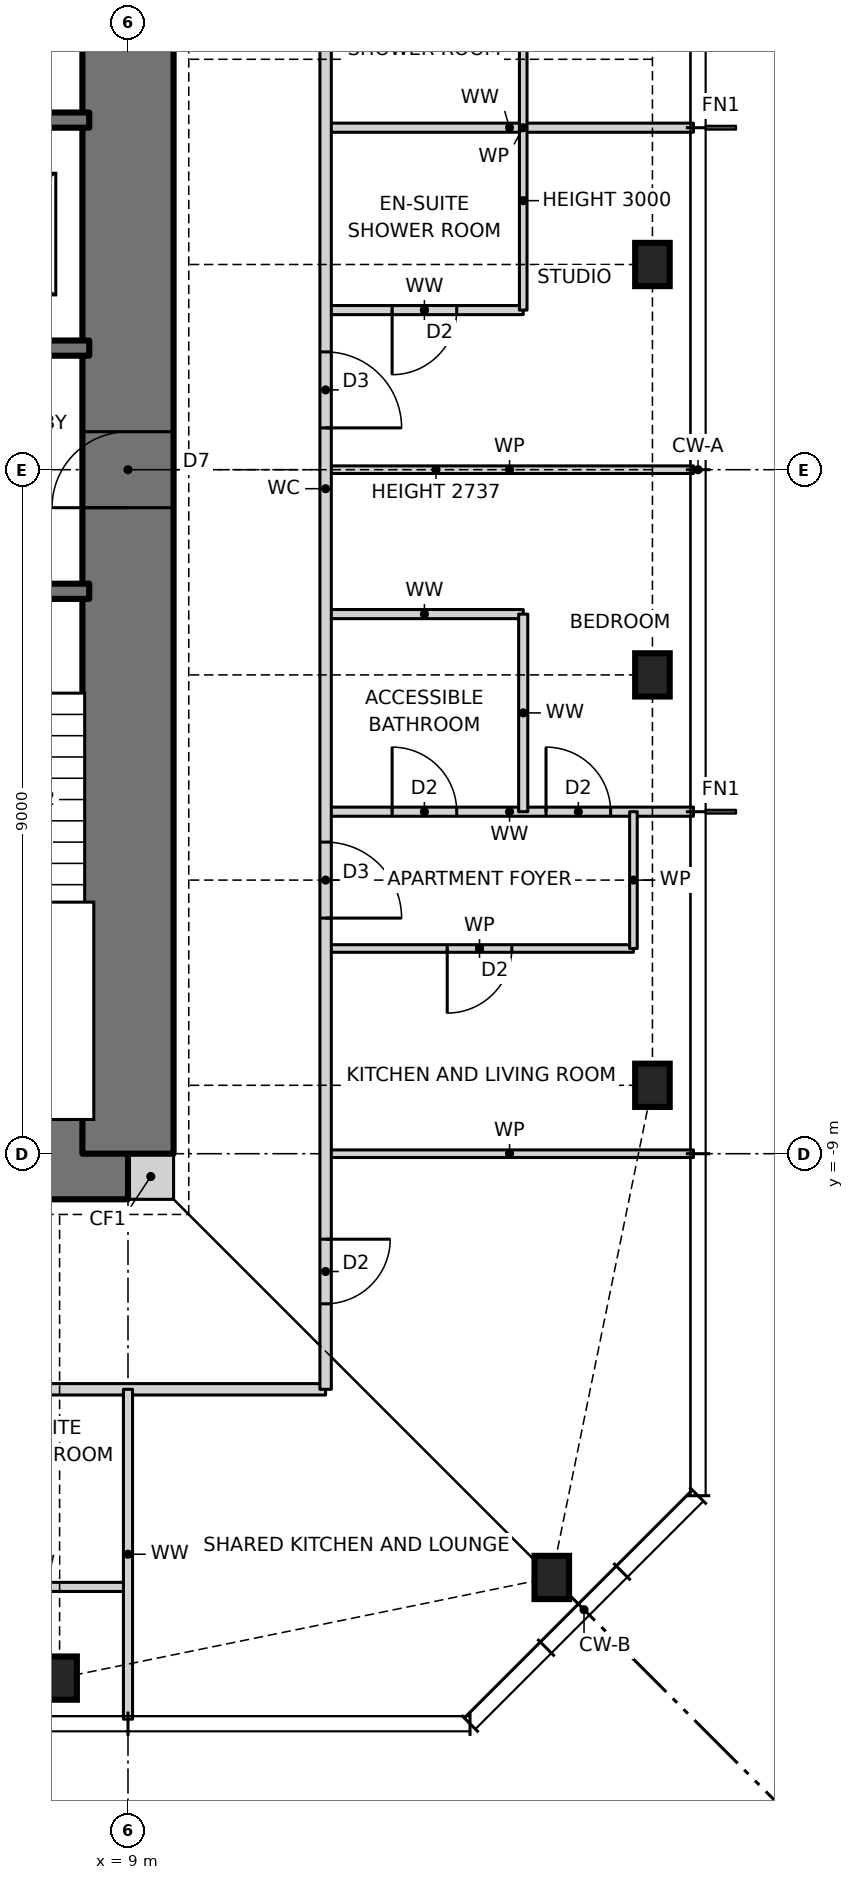
"""IFC4 building model, lengths in metres.
Left out: names, types, materials, properties, quantities, classifications, styles, units other than length and angle.
Written with IfcOpenShell. Run it as: python <this file> out.ifc"""

import sys

from ifc_helpers import new_model, si_unit, direction, frame, frame_2d, origin, origin_2d, place, context, subcontext, project, spatial, rectangle, i_section, extrude, element, fill, save


model = new_model("IFC4")
c1 = context("Model", 3, precision=1e-05, world=origin(), true_north=direction((0.0, 1.0)))
c2 = subcontext(c1, "Body", "Model", "MODEL_VIEW")
j1 = project(units=[si_unit("LENGTHUNIT", "METRE"), si_unit("PLANEANGLEUNIT", "RADIAN")], contexts=[c1])
p1 = place(None, origin())
s1 = spatial("IfcSite", under=j1, at=p1, CompositionType="ELEMENT")
p2 = place(p1, origin())
s2 = spatial("IfcBuilding", under=s1, at=p2, CompositionType="ELEMENT")
p3 = place(p2, frame((0.0, 0.0, 260.5)))
s3 = spatial("IfcBuildingStorey", under=s2, at=p3, CompositionType="ELEMENT", Elevation=260.5)
for number, where, z_axis, x_axis in (
    (1, (8.1, -15.9, 0.0), (0.0, 0.0, 1.0), (1.0, 0.0, 0.0)),
    (2, (14.576, -14.576, 0.0), (0.0, 0.0, 1.0), (1.0, 0.0, 0.0)),
    (3, (15.9, -8.1, 0.0), (0.0, 0.0, 1.0), (1.0, 0.0, 0.0)),
    (4, (15.9, -2.7, 0.0), (0.0, 0.0, 1.0), (1.0, 0.0, 0.0)),
    (5, (15.9, 2.7, 0.0), (0.0, 0.0, 1.0), (1.0, 0.0, 0.0)),
):
    element("IfcColumn", number, at=place(p3, frame(where, z_axis=z_axis, x_axis=x_axis)), inside=s3, PredefinedType="COLUMN", context=c2, shape_type="SweptSolid", body=[
        extrude(i_section(OverallWidth=0.455, OverallDepth=0.569, WebThickness=0.078, FlangeThickness=0.125, at=origin_2d()), origin(), (0.0, 0.0, 1.0), 3.5),
    ])
p4 = place(p3, frame((9.0, -9.3, 0.0), z_axis=(0.0, 0.0, 1.0), x_axis=(1.0, 0.0, 0.0)))
e6 = element("IfcWall", 6, at=p4, inside=s3, PredefinedType="SOLIDWALL", context=c2, shape_type="SweptSolid", body=[
    extrude(rectangle(XDim=0.6, YDim=0.6, at=frame_2d((0.3, 0.0))), origin(), (0.0, 0.0, 1.0), 3.5),
])
p5 = place(p3, frame((-9.0, -9.0, 0.0), z_axis=(0.0, 0.0, 1.0), x_axis=(1.0, 0.0, 0.0)))
e7 = element("IfcWall", 7, at=p5, inside=s3, PredefinedType="SHEAR", context=c2, shape_type="SweptSolid", body=[
    extrude(rectangle(XDim=18.0, YDim=1.2, at=frame_2d((9.0, 0.0))), origin(), (0.0, 0.0, 1.0), 3.5),
])
p6 = place(p5, frame((3.775, 0.0, 0.0)))
e8 = element("IfcOpeningElement", 8, at=p6, cuts=e7, PredefinedType="OPENING", context=c2, shape_type="SweptSolid", body=[
    extrude(rectangle(XDim=0.9, YDim=2.1, at=frame_2d((0.45, 1.05))), frame((0.0, 0.61, 0.0), z_axis=(0.0, -1.0, 0.0), x_axis=(1.0, 0.0, 0.0)), (0.0, 0.0, 1.0), 1.22),
])
p7 = place(p5, frame((10.625, 0.0, 0.0)))
e9 = element("IfcOpeningElement", 9, at=p7, cuts=e7, PredefinedType="OPENING", context=c2, shape_type="SweptSolid", body=[
    extrude(rectangle(XDim=0.9, YDim=2.1, at=frame_2d((0.45, 1.05))), frame((0.0, 0.61, 0.0), z_axis=(0.0, -1.0, 0.0), x_axis=(1.0, 0.0, 0.0)), (0.0, 0.0, 1.0), 1.22),
])
p8 = place(p3, frame((9.0, -9.0, 0.0), z_axis=(0.0, 0.0, 1.0), x_axis=(0.0, 1.0, 0.0)))
e10 = element("IfcWall", 10, at=p8, inside=s3, PredefinedType="SHEAR", context=c2, shape_type="SweptSolid", body=[
    extrude(rectangle(XDim=18.0, YDim=1.2, at=frame_2d((9.0, 0.0))), origin(), (0.0, 0.0, 1.0), 3.5),
])
p9 = place(p8, frame((8.5, 0.0, 0.0)))
e11 = element("IfcOpeningElement", 11, at=p9, cuts=e10, PredefinedType="OPENING", context=c2, shape_type="SweptSolid", body=[
    extrude(rectangle(XDim=1.0, YDim=2.1, at=frame_2d((0.5, 1.05))), frame((0.0, 0.61, 0.0), z_axis=(0.0, -1.0, 0.0), x_axis=(1.0, 0.0, 0.0)), (0.0, 0.0, 1.0), 1.22),
])
p10 = place(p3, frame((6.6, -14.7, 0.0), z_axis=(0.0, 0.0, 1.0), x_axis=(1.0, 0.0, 0.0)))
e12 = element("IfcWall", 12, at=p10, inside=s3, PredefinedType="PARTITIONING", context=c2, shape_type="SweptSolid", body=[
    extrude(rectangle(XDim=2.4, YDim=0.12, at=frame_2d((1.2, 0.0))), origin(), (0.0, 0.0, 1.0), 3.27),
])
p11 = place(p3, frame((-11.6, -12.1, 0.0), z_axis=(0.0, 0.0, 1.0), x_axis=(1.0, 0.0, 0.0)))
e13 = element("IfcWall", 13, at=p11, inside=s3, PredefinedType="PARTITIONING", context=c2, shape_type="SweptSolid", body=[
    extrude(rectangle(XDim=23.2, YDim=0.15, at=frame_2d((11.6, 0.0))), origin(), (0.0, 0.0, 1.0), 3.27),
])
p12 = place(p11, frame((6.2, 0.0, 0.0)))
e14 = element("IfcOpeningElement", 14, at=p12, cuts=e13, PredefinedType="OPENING", context=c2, shape_type="SweptSolid", body=[
    extrude(rectangle(XDim=1.8, YDim=2.1, at=frame_2d((0.9, 1.05))), frame((0.0, 0.085, 0.0), z_axis=(0.0, -1.0, 0.0), x_axis=(1.0, 0.0, 0.0)), (0.0, 0.0, 1.0), 0.17),
])
p13 = place(p11, frame((13.35, 0.0, 0.0)))
e15 = element("IfcOpeningElement", 15, at=p13, cuts=e13, PredefinedType="OPENING", context=c2, shape_type="SweptSolid", body=[
    extrude(rectangle(XDim=1.0, YDim=2.1, at=frame_2d((0.5, 1.05))), frame((0.0, 0.085, 0.0), z_axis=(0.0, -1.0, 0.0), x_axis=(1.0, 0.0, 0.0)), (0.0, 0.0, 1.0), 0.17),
])
p14 = place(p3, frame((11.6, -9.0, 0.0), z_axis=(0.0, 0.0, 1.0), x_axis=(1.0, 0.0, 0.0)))
e16 = element("IfcWall", 16, at=p14, inside=s3, PredefinedType="PARTITIONING", context=c2, shape_type="SweptSolid", body=[
    extrude(rectangle(XDim=4.84, YDim=0.1, at=frame_2d((2.42, 0.0))), origin(), (0.0, 0.0, 1.0), 3.27),
])
p15 = place(p3, frame((11.6, -6.3, 0.0), z_axis=(0.0, 0.0, 1.0), x_axis=(1.0, 0.0, 0.0)))
e17 = element("IfcWall", 17, at=p15, inside=s3, PredefinedType="PARTITIONING", context=c2, shape_type="SweptSolid", body=[
    extrude(rectangle(XDim=4.05, YDim=0.1, at=frame_2d((2.025, 0.0))), origin(), (0.0, 0.0, 1.0), 3.27),
])
p16 = place(p15, frame((1.6, 0.0, 0.0)))
e18 = element("IfcOpeningElement", 18, at=p16, cuts=e17, PredefinedType="OPENING", context=c2, shape_type="SweptSolid", body=[
    extrude(rectangle(XDim=0.85, YDim=2.1, at=frame_2d((0.425, 1.05))), frame((0.0, 0.06, 0.0), z_axis=(0.0, -1.0, 0.0), x_axis=(1.0, 0.0, 0.0)), (0.0, 0.0, 1.0), 0.12),
])
p17 = place(p3, frame((11.6, -4.5, 0.0), z_axis=(0.0, 0.0, 1.0), x_axis=(1.0, 0.0, 0.0)))
e19 = element("IfcWall", 19, at=p17, inside=s3, PredefinedType="PARTITIONING", context=c2, shape_type="SweptSolid", body=[
    extrude(rectangle(XDim=4.84, YDim=0.12, at=frame_2d((2.42, 0.0))), origin(), (0.0, 0.0, 1.0), 3.27),
])
p18 = place(p17, frame((2.9, 0.0, 0.0)))
e20 = element("IfcOpeningElement", 20, at=p18, cuts=e19, PredefinedType="OPENING", context=c2, shape_type="SweptSolid", body=[
    extrude(rectangle(XDim=0.85, YDim=2.1, at=frame_2d((0.425, 1.05))), frame((0.0, 0.07, 0.0), z_axis=(0.0, -1.0, 0.0), x_axis=(1.0, 0.0, 0.0)), (0.0, 0.0, 1.0), 0.14),
])
p19 = place(p17, frame((0.875, 0.0, 0.0)))
e21 = element("IfcOpeningElement", 21, at=p19, cuts=e19, PredefinedType="OPENING", context=c2, shape_type="SweptSolid", body=[
    extrude(rectangle(XDim=0.85, YDim=2.1, at=frame_2d((0.425, 1.05))), frame((0.0, 0.07, 0.0), z_axis=(0.0, -1.0, 0.0), x_axis=(1.0, 0.0, 0.0)), (0.0, 0.0, 1.0), 0.14),
])
p20 = place(p3, frame((11.6, -1.9, 0.0), z_axis=(0.0, 0.0, 1.0), x_axis=(1.0, 0.0, 0.0)))
e22 = element("IfcWall", 22, at=p20, inside=s3, PredefinedType="PARTITIONING", context=c2, shape_type="SweptSolid", body=[
    extrude(rectangle(XDim=2.6, YDim=0.12, at=frame_2d((1.3, 0.0))), origin(), (0.0, 0.0, 1.0), 3.27),
])
p21 = place(p3, frame((-8.49, -1.6, 0.0), z_axis=(0.0, 0.0, 1.0), x_axis=(1.0, 0.0, 0.0)))
e23 = element("IfcWall", 23, at=p21, inside=s3, PredefinedType="SOLIDWALL", context=c2, shape_type="SweptSolid", body=[
    extrude(rectangle(XDim=16.98, YDim=0.2, at=frame_2d((8.49, 0.0))), origin(), (0.0, 0.0, 1.0), 3.5),
])
p22 = place(p21, frame((14.81, 0.0, 0.0)))
e24 = element("IfcOpeningElement", 24, at=p22, cuts=e23, PredefinedType="OPENING", context=c2, shape_type="SweptSolid", body=[
    extrude(rectangle(XDim=1.0, YDim=2.1, at=frame_2d((0.5, 1.05))), frame((0.0, 0.11, 0.0), z_axis=(0.0, -1.0, 0.0), x_axis=(1.0, 0.0, 0.0)), (0.0, 0.0, 1.0), 0.22),
])
p23 = place(p21, frame((1.232, 0.0, 0.0)))
e25 = element("IfcOpeningElement", 25, at=p23, cuts=e23, PredefinedType="OPENING", context=c2, shape_type="SweptSolid", body=[
    extrude(rectangle(XDim=0.9, YDim=2.1, at=frame_2d((0.45, 1.05))), frame((0.0, 0.11, 0.0), z_axis=(0.0, -1.0, 0.0), x_axis=(1.0, 0.0, 0.0)), (0.0, 0.0, 1.0), 0.22),
])
p24 = place(p21, frame((4.627, 0.0, 0.0)))
e26 = element("IfcOpeningElement", 26, at=p24, cuts=e23, PredefinedType="OPENING", context=c2, shape_type="SweptSolid", body=[
    extrude(rectangle(XDim=0.9, YDim=2.1, at=frame_2d((0.45, 1.05))), frame((0.0, 0.11, 0.0), z_axis=(0.0, -1.0, 0.0), x_axis=(1.0, 0.0, 0.0)), (0.0, 0.0, 1.0), 0.22),
])
p25 = place(p21, frame((8.052, 0.0, 0.0)))
e27 = element("IfcOpeningElement", 27, at=p25, cuts=e23, PredefinedType="OPENING", context=c2, shape_type="SweptSolid", body=[
    extrude(rectangle(XDim=0.9, YDim=2.1, at=frame_2d((0.45, 1.05))), frame((0.0, 0.11, 0.0), z_axis=(0.0, -1.0, 0.0), x_axis=(1.0, 0.0, 0.0)), (0.0, 0.0, 1.0), 0.22),
])
p26 = place(p21, frame((11.478, 0.0, 0.0)))
e28 = element("IfcOpeningElement", 28, at=p26, cuts=e23, PredefinedType="OPENING", context=c2, shape_type="SweptSolid", body=[
    extrude(rectangle(XDim=0.9, YDim=2.1, at=frame_2d((0.45, 1.05))), frame((0.0, 0.11, 0.0), z_axis=(0.0, -1.0, 0.0), x_axis=(1.0, 0.0, 0.0)), (0.0, 0.0, 1.0), 0.22),
])
p27 = place(p3, frame((11.6, 0.0, 0.0), z_axis=(0.0, 0.0, 1.0), x_axis=(1.0, 0.0, 0.0)))
e29 = element("IfcWall", 29, at=p27, inside=s3, PredefinedType="PARTITIONING", context=c2, shape_type="SweptSolid", body=[
    extrude(rectangle(XDim=4.84, YDim=0.1, at=frame_2d((2.42, 0.0))), origin(), (0.0, 0.0, 1.0), 2.737),
])
p28 = place(p3, frame((-8.49, 1.6, 0.0), z_axis=(0.0, 0.0, 1.0), x_axis=(1.0, 0.0, 0.0)))
e30 = element("IfcWall", 30, at=p28, inside=s3, PredefinedType="SOLIDWALL", context=c2, shape_type="SweptSolid", body=[
    extrude(rectangle(XDim=16.98, YDim=0.2, at=frame_2d((8.49, 0.0))), origin(), (0.0, 0.0, 1.0), 3.5),
])
p29 = place(p28, frame((1.17, 0.0, 0.0)))
e31 = element("IfcOpeningElement", 31, at=p29, cuts=e30, PredefinedType="OPENING", context=c2, shape_type="SweptSolid", body=[
    extrude(rectangle(XDim=1.0, YDim=2.1, at=frame_2d((0.5, 1.05))), frame((0.0, 0.11, 0.0), z_axis=(0.0, -1.0, 0.0), x_axis=(1.0, 0.0, 0.0)), (0.0, 0.0, 1.0), 0.22),
])
p30 = place(p28, frame((5.379, 0.0, 0.0)))
e32 = element("IfcOpeningElement", 32, at=p30, cuts=e30, PredefinedType="OPENING", context=c2, shape_type="SweptSolid", body=[
    extrude(rectangle(XDim=0.9, YDim=2.1, at=frame_2d((0.45, 1.05))), frame((0.0, 0.11, 0.0), z_axis=(0.0, -1.0, 0.0), x_axis=(1.0, 0.0, 0.0)), (0.0, 0.0, 1.0), 0.22),
])
p31 = place(p28, frame((3.662, 0.0, 0.0)))
e33 = element("IfcOpeningElement", 33, at=p31, cuts=e30, PredefinedType="OPENING", context=c2, shape_type="SweptSolid", body=[
    extrude(rectangle(XDim=0.9, YDim=2.1, at=frame_2d((0.45, 1.05))), frame((0.0, 0.11, 0.0), z_axis=(0.0, -1.0, 0.0), x_axis=(1.0, 0.0, 0.0)), (0.0, 0.0, 1.0), 0.22),
])
p32 = place(p28, frame((8.04, 0.0, 0.0)))
e34 = element("IfcOpeningElement", 34, at=p32, cuts=e30, PredefinedType="OPENING", context=c2, shape_type="SweptSolid", body=[
    extrude(rectangle(XDim=0.9, YDim=2.1, at=frame_2d((0.45, 1.05))), frame((0.0, 0.11, 0.0), z_axis=(0.0, -1.0, 0.0), x_axis=(1.0, 0.0, 0.0)), (0.0, 0.0, 1.0), 0.22),
])
p33 = place(p28, frame((11.374, 0.0, 0.0)))
e35 = element("IfcOpeningElement", 35, at=p33, cuts=e30, PredefinedType="OPENING", context=c2, shape_type="SweptSolid", body=[
    extrude(rectangle(XDim=1.1, YDim=2.1, at=frame_2d((0.55, 1.05))), frame((0.0, 0.11, 0.0), z_axis=(0.0, -1.0, 0.0), x_axis=(1.0, 0.0, 0.0)), (0.0, 0.0, 1.0), 0.22),
])
p34 = place(p28, frame((14.66, 0.0, 0.0)))
e36 = element("IfcOpeningElement", 36, at=p34, cuts=e30, PredefinedType="OPENING", context=c2, shape_type="SweptSolid", body=[
    extrude(rectangle(XDim=1.3, YDim=2.1, at=frame_2d((0.65, 1.05))), frame((0.0, 0.11, 0.0), z_axis=(0.0, -1.0, 0.0), x_axis=(1.0, 0.0, 0.0)), (0.0, 0.0, 1.0), 0.22),
])
p35 = place(p3, frame((11.6, 2.1, 0.0), z_axis=(0.0, 0.0, 1.0), x_axis=(1.0, 0.0, 0.0)))
e37 = element("IfcWall", 37, at=p35, inside=s3, PredefinedType="PARTITIONING", context=c2, shape_type="SweptSolid", body=[
    extrude(rectangle(XDim=2.6, YDim=0.12, at=frame_2d((1.3, 0.0))), origin(), (0.0, 0.0, 1.0), 3.27),
])
p36 = place(p35, frame((0.875, 0.0, 0.0)))
e38 = element("IfcOpeningElement", 38, at=p36, cuts=e37, PredefinedType="OPENING", context=c2, shape_type="SweptSolid", body=[
    extrude(rectangle(XDim=0.85, YDim=2.1, at=frame_2d((0.425, 1.05))), frame((0.0, 0.07, 0.0), z_axis=(0.0, -1.0, 0.0), x_axis=(1.0, 0.0, 0.0)), (0.0, 0.0, 1.0), 0.14),
])
p37 = place(p3, frame((11.6, 4.5, 0.0), z_axis=(0.0, 0.0, 1.0), x_axis=(1.0, 0.0, 0.0)))
e39 = element("IfcWall", 39, at=p37, inside=s3, PredefinedType="PARTITIONING", context=c2, shape_type="SweptSolid", body=[
    extrude(rectangle(XDim=4.84, YDim=0.12, at=frame_2d((2.42, 0.0))), origin(), (0.0, 0.0, 1.0), 3.27),
])
p38 = place(p3, frame((5.15, 4.6, 0.0), z_axis=(0.0, 0.0, 1.0), x_axis=(1.0, 0.0, 0.0)))
e40 = element("IfcWall", 40, at=p38, inside=s3, PredefinedType="SOLIDWALL", context=c2, shape_type="SweptSolid", body=[
    extrude(rectangle(XDim=3.34, YDim=0.2, at=frame_2d((1.67, 0.0))), origin(), (0.0, 0.0, 1.0), 3.5),
])
p39 = place(p3, frame((15.65, -6.3, 0.0), z_axis=(0.0, 0.0, 1.0), x_axis=(0.0, 1.0, 0.0)))
e41 = element("IfcWall", 41, at=p39, inside=s3, PredefinedType="PARTITIONING", context=c2, shape_type="SweptSolid", body=[
    extrude(rectangle(XDim=1.8, YDim=0.1, at=frame_2d((0.9, 0.0))), origin(), (0.0, 0.0, 1.0), 3.27),
])
p40 = place(p3, frame((14.2, -4.5, 0.0), z_axis=(0.0, 0.0, 1.0), x_axis=(0.0, 1.0, 0.0)))
e42 = element("IfcWall", 42, at=p40, inside=s3, PredefinedType="PARTITIONING", context=c2, shape_type="SweptSolid", body=[
    extrude(rectangle(XDim=2.6, YDim=0.12, at=frame_2d((1.3, 0.0))), origin(), (0.0, 0.0, 1.0), 3.27),
])
p41 = place(p3, frame((14.2, 2.1, 0.0), z_axis=(0.0, 0.0, 1.0), x_axis=(0.0, 1.0, 0.0)))
e43 = element("IfcWall", 43, at=p41, inside=s3, PredefinedType="PARTITIONING", context=c2, shape_type="SweptSolid", body=[
    extrude(rectangle(XDim=4.8, YDim=0.1, at=frame_2d((2.4, 0.0))), origin(), (0.0, 0.0, 1.0), 3.0),
])
p42 = place(p3, frame((11.6, -12.1, 0.0), z_axis=(0.0, 0.0, 1.0), x_axis=(0.0, 1.0, 0.0)))
e44 = element("IfcWall", 44, at=p42, inside=s3, PredefinedType="PARTITIONING", context=c2, shape_type="SweptSolid", body=[
    extrude(rectangle(XDim=23.7, YDim=0.15, at=frame_2d((11.85, 0.0))), origin(), (0.0, 0.0, 1.0), 3.27),
])
p43 = place(p42, frame((6.2, 0.0, 0.0)))
e45 = element("IfcOpeningElement", 45, at=p43, cuts=e44, PredefinedType="OPENING", context=c2, shape_type="SweptSolid", body=[
    extrude(rectangle(XDim=1.0, YDim=2.1, at=frame_2d((0.5, 1.05))), frame((0.0, 0.085, 0.0), z_axis=(0.0, -1.0, 0.0), x_axis=(1.0, 0.0, 0.0)), (0.0, 0.0, 1.0), 0.17),
])
p44 = place(p42, frame((12.65, 0.0, 0.0)))
e46 = element("IfcOpeningElement", 46, at=p44, cuts=e44, PredefinedType="OPENING", context=c2, shape_type="SweptSolid", body=[
    extrude(rectangle(XDim=1.0, YDim=2.1, at=frame_2d((0.5, 1.05))), frame((0.0, 0.085, 0.0), z_axis=(0.0, -1.0, 0.0), x_axis=(1.0, 0.0, 0.0)), (0.0, 0.0, 1.0), 0.17),
])
p45 = place(p42, frame((19.55, 0.0, 0.0)))
e47 = element("IfcOpeningElement", 47, at=p45, cuts=e44, PredefinedType="OPENING", context=c2, shape_type="SweptSolid", body=[
    extrude(rectangle(XDim=1.0, YDim=2.1, at=frame_2d((0.5, 1.05))), frame((0.0, 0.085, 0.0), z_axis=(0.0, -1.0, 0.0), x_axis=(1.0, 0.0, 0.0)), (0.0, 0.0, 1.0), 0.17),
])
p46 = place(p42, frame((21.5, 0.0, 0.0)))
e48 = element("IfcOpeningElement", 48, at=p46, cuts=e44, PredefinedType="OPENING", context=c2, shape_type="SweptSolid", body=[
    extrude(rectangle(XDim=1.8, YDim=2.1, at=frame_2d((0.9, 1.05))), frame((0.0, 0.085, 0.0), z_axis=(0.0, -1.0, 0.0), x_axis=(1.0, 0.0, 0.0)), (0.0, 0.0, 1.0), 0.17),
])
p47 = place(p42, frame((1.125, 0.0, 0.0)))
e49 = element("IfcOpeningElement", 49, at=p47, cuts=e44, PredefinedType="OPENING", context=c2, shape_type="SweptSolid", body=[
    extrude(rectangle(XDim=0.85, YDim=2.1, at=frame_2d((0.425, 1.05))), frame((0.0, 0.085, 0.0), z_axis=(0.0, -1.0, 0.0), x_axis=(1.0, 0.0, 0.0)), (0.0, 0.0, 1.0), 0.17),
])
p48 = place(p3, frame((9.0, -16.44, 0.0), z_axis=(0.0, 0.0, 1.0), x_axis=(0.0, 1.0, 0.0)))
e50 = element("IfcWall", 50, at=p48, inside=s3, PredefinedType="PARTITIONING", context=c2, shape_type="SweptSolid", body=[
    extrude(rectangle(XDim=4.34, YDim=0.12, at=frame_2d((2.17, 0.0))), origin(), (0.0, 0.0, 1.0), 3.27),
])
p49 = place(p43, frame((1.0, 0.0, 0.0), z_axis=(0.0, 0.0, 1.0), x_axis=(-1.0, 0.0, 0.0)))
e51 = element("IfcDoor", 51, at=p49, inside=s3, OperationType="SINGLE_SWING_RIGHT", PredefinedType="DOOR", context=c2, shape_type="SweptSolid", body=[
    extrude(rectangle(XDim=1.0, YDim=2.1, at=frame_2d((0.5, 1.05))), frame((0.0, 0.025, 0.0), z_axis=(0.0, -1.0, 0.0), x_axis=(1.0, 0.0, 0.0)), (0.0, 0.0, 1.0), 0.05),
])
fill(e45, e51)
p50 = place(p16, frame((0.85, 0.0, 0.0), z_axis=(0.0, 0.0, 1.0), x_axis=(-1.0, 0.0, 0.0)))
e52 = element("IfcDoor", 52, at=p50, inside=s3, OperationType="SINGLE_SWING_RIGHT", PredefinedType="DOOR", context=c2, shape_type="SweptSolid", body=[
    extrude(rectangle(XDim=0.85, YDim=2.1, at=frame_2d((0.425, 1.05))), frame((0.0, 0.025, 0.0), z_axis=(0.0, -1.0, 0.0), x_axis=(1.0, 0.0, 0.0)), (0.0, 0.0, 1.0), 0.05),
])
fill(e18, e52)
p51 = place(p18, origin())
e53 = element("IfcDoor", 53, at=p51, inside=s3, OperationType="SINGLE_SWING_LEFT", PredefinedType="DOOR", context=c2, shape_type="SweptSolid", body=[
    extrude(rectangle(XDim=0.85, YDim=2.1, at=frame_2d((0.425, 1.05))), frame((0.0, 0.025, 0.0), z_axis=(0.0, -1.0, 0.0), x_axis=(1.0, 0.0, 0.0)), (0.0, 0.0, 1.0), 0.05),
])
fill(e20, e53)
p52 = place(p19, origin())
e54 = element("IfcDoor", 54, at=p52, inside=s3, OperationType="SINGLE_SWING_LEFT", PredefinedType="DOOR", context=c2, shape_type="SweptSolid", body=[
    extrude(rectangle(XDim=0.85, YDim=2.1, at=frame_2d((0.425, 1.05))), frame((0.0, 0.025, 0.0), z_axis=(0.0, -1.0, 0.0), x_axis=(1.0, 0.0, 0.0)), (0.0, 0.0, 1.0), 0.05),
])
fill(e21, e54)
p53 = place(p44, frame((1.0, 0.0, 0.0), z_axis=(0.0, 0.0, 1.0), x_axis=(-1.0, 0.0, 0.0)))
e55 = element("IfcDoor", 55, at=p53, inside=s3, OperationType="SINGLE_SWING_RIGHT", PredefinedType="DOOR", context=c2, shape_type="SweptSolid", body=[
    extrude(rectangle(XDim=1.0, YDim=2.1, at=frame_2d((0.5, 1.05))), frame((0.0, 0.025, 0.0), z_axis=(0.0, -1.0, 0.0), x_axis=(1.0, 0.0, 0.0)), (0.0, 0.0, 1.0), 0.05),
])
fill(e46, e55)
p54 = place(p36, frame((0.85, 0.0, 0.0), z_axis=(0.0, 0.0, 1.0), x_axis=(-1.0, 0.0, 0.0)))
e56 = element("IfcDoor", 56, at=p54, inside=s3, OperationType="SINGLE_SWING_RIGHT", PredefinedType="DOOR", context=c2, shape_type="SweptSolid", body=[
    extrude(rectangle(XDim=0.85, YDim=2.1, at=frame_2d((0.425, 1.05))), frame((0.0, 0.025, 0.0), z_axis=(0.0, -1.0, 0.0), x_axis=(1.0, 0.0, 0.0)), (0.0, 0.0, 1.0), 0.05),
])
fill(e38, e56)
p55 = place(p47, frame((0.85, 0.0, 0.0), z_axis=(0.0, 0.0, 1.0), x_axis=(-1.0, 0.0, 0.0)))
e57 = element("IfcDoor", 57, at=p55, inside=s3, OperationType="SINGLE_SWING_LEFT", PredefinedType="DOOR", context=c2, shape_type="SweptSolid", body=[
    extrude(rectangle(XDim=0.85, YDim=2.1, at=frame_2d((0.425, 1.05))), frame((0.0, 0.025, 0.0), z_axis=(0.0, -1.0, 0.0), x_axis=(1.0, 0.0, 0.0)), (0.0, 0.0, 1.0), 0.05),
])
fill(e49, e57)
p56 = place(p9, origin())
e58 = element("IfcDoor", 58, at=p56, inside=s3, OperationType="SINGLE_SWING_LEFT", PredefinedType="DOOR", context=c2, shape_type="SweptSolid", body=[
    extrude(rectangle(XDim=1.0, YDim=2.1, at=frame_2d((0.5, 1.05))), frame((0.0, 0.025, 0.0), z_axis=(0.0, -1.0, 0.0), x_axis=(1.0, 0.0, 0.0)), (0.0, 0.0, 1.0), 0.05),
])
fill(e11, e58)
save(model, sys.argv[1])
